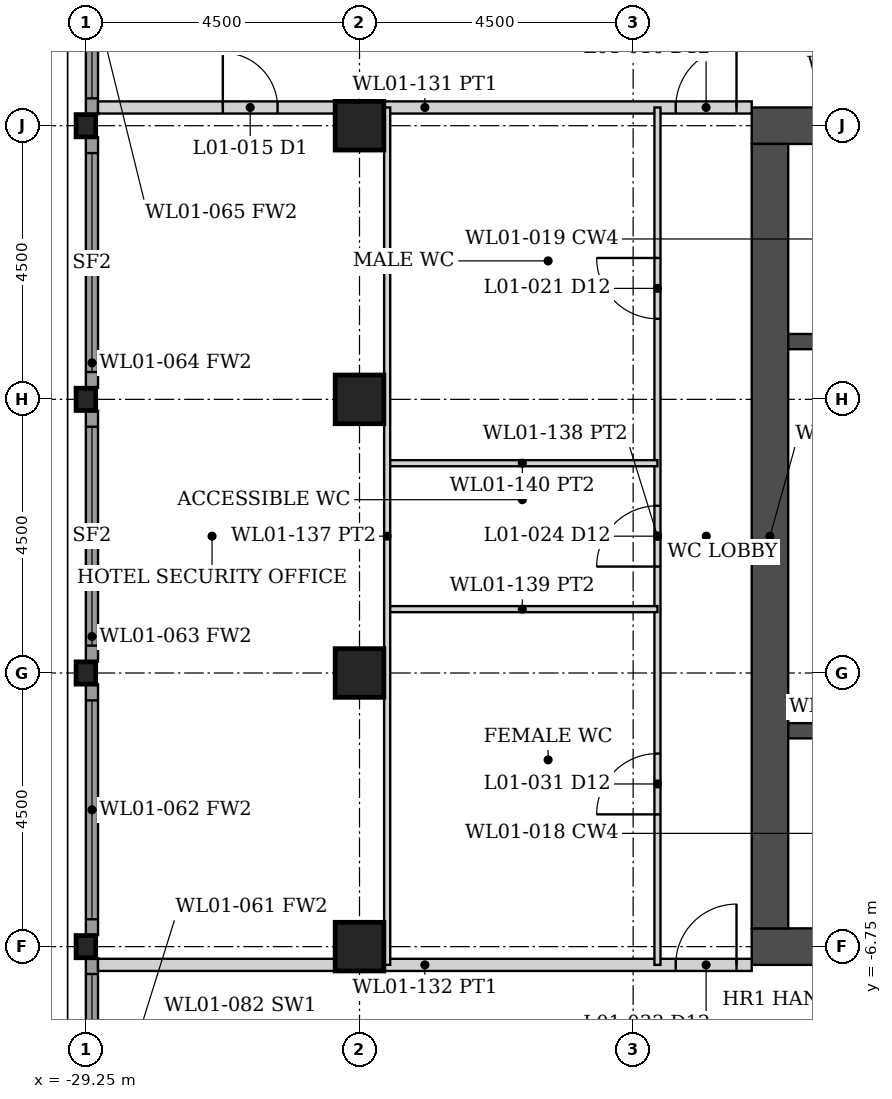
"""IFC4 building model, lengths in metres.
Left out: names, types, materials, properties, quantities, classifications, styles, units other than length and angle.
Written with IfcOpenShell. Run it as: python <this file> out.ifc"""

import sys

from ifc_helpers import new_model, si_unit, direction, frame, frame_2d, origin, origin_2d, place, context, subcontext, project, spatial, rectangle, hollow_rectangle, i_section, extrude, element, fill, save


model = new_model("IFC4")
c1 = context("Model", 3, precision=1e-05, world=origin(), true_north=direction((0.0, 1.0)))
c2 = subcontext(c1, "Body", "Model", "MODEL_VIEW")
j1 = project(units=[si_unit("LENGTHUNIT", "METRE"), si_unit("PLANEANGLEUNIT", "RADIAN")], contexts=[c1])
p1 = place(None, origin())
s1 = spatial("IfcSite", under=j1, at=p1, CompositionType="ELEMENT")
p2 = place(p1, origin())
s2 = spatial("IfcBuilding", under=s1, at=p2, CompositionType="ELEMENT")
p3 = place(p2, frame((0.0, 0.0, 6.0)))
s3 = spatial("IfcBuildingStorey", under=s2, at=p3, CompositionType="ELEMENT", Elevation=6.0)
for number, where, z_axis, x_axis in (
    (1, (-24.75, -6.75, 0.0), (0.0, 0.0, 1.0), (1.0, 0.0, 0.0)),
    (2, (-24.75, -2.25, 0.0), (0.0, 0.0, 1.0), (1.0, 0.0, 0.0)),
    (3, (-24.75, 2.25, 0.0), (0.0, 0.0, 1.0), (1.0, 0.0, 0.0)),
    (4, (-24.75, 6.75, 0.0), (0.0, 0.0, 1.0), (1.0, 0.0, 0.0)),
):
    element("IfcColumn", number, at=place(p3, frame(where, z_axis=z_axis, x_axis=x_axis)), inside=s3, PredefinedType="COLUMN", context=c2, shape_type="SweptSolid", body=[
        extrude(hollow_rectangle(XDim=0.8, YDim=0.8, WallThickness=0.08, at=origin_2d()), origin(), (0.0, 0.0, 1.0), 5.0),
    ])
for number, where, z_axis, x_axis in (
    (5, (-29.25, -6.75, 0.0), (0.0, 0.0, 1.0), (1.0, 0.0, 0.0)),
    (6, (-29.25, -2.25, 0.0), (0.0, 0.0, 1.0), (1.0, 0.0, 0.0)),
    (7, (-29.25, 2.25, 0.0), (0.0, 0.0, 1.0), (1.0, 0.0, 0.0)),
    (8, (-29.25, 6.75, 0.0), (0.0, 0.0, 1.0), (1.0, 0.0, 0.0)),
):
    element("IfcColumn", number, at=place(p3, frame(where, z_axis=z_axis, x_axis=x_axis)), inside=s3, PredefinedType="COLUMN", context=c2, shape_type="SweptSolid", body=[
        extrude(i_section(OverallWidth=0.322, OverallDepth=0.365, WebThickness=0.027, FlangeThickness=0.044, FilletRadius=0.015, at=origin_2d()), origin(), (0.0, 0.0, 1.0), 5.0),
    ])
for number, where, z_axis, x_axis in (
    (9, (-8.7, -6.75, 0.0), (0.0, 0.0, 1.0), (-1.0, 0.0, 0.0)),
    (10, (-8.7, 6.75, 0.0), (0.0, 0.0, 1.0), (-1.0, 0.0, 0.0)),
):
    element("IfcWall", number, at=place(p3, frame(where, z_axis=z_axis, x_axis=x_axis)), inside=s3, PredefinedType="SHEAR", context=c2, shape_type="SweptSolid", body=[
        extrude(rectangle(XDim=9.6, YDim=0.6, at=frame_2d((4.8, 0.0))), origin(), (0.0, 0.0, 1.0), 5.0),
    ])
p4 = place(p3, frame((-18.0, -6.45, 0.0), z_axis=(0.0, 0.0, 1.0), x_axis=(0.0, 1.0, 0.0)))
e11 = element("IfcWall", 11, at=p4, inside=s3, PredefinedType="SHEAR", context=c2, shape_type="SweptSolid", body=[
    extrude(rectangle(XDim=12.9, YDim=0.6, at=frame_2d((6.45, 0.0))), origin(), (0.0, 0.0, 1.0), 5.0),
])
p5 = place(p3, frame((-9.3, -3.2, 0.0), z_axis=(0.0, 0.0, 1.0), x_axis=(-1.0, 0.0, 0.0)))
e12 = element("IfcWall", 12, at=p5, inside=s3, PredefinedType="SHEAR", context=c2, shape_type="SweptSolid", body=[
    extrude(rectangle(XDim=8.4, YDim=0.25, at=frame_2d((4.2, 0.0))), origin(), (0.0, 0.0, 1.0), 5.0),
])
p6 = place(p5, frame((0.15, 0.0, 0.0)))
e13 = element("IfcOpeningElement", 13, at=p6, cuts=e12, PredefinedType="OPENING", context=c2, shape_type="SweptSolid", body=[
    extrude(rectangle(XDim=1.0, YDim=2.1, at=frame_2d((0.5, 1.05))), frame((0.0, 0.135, 0.0), z_axis=(0.0, -1.0, 0.0), x_axis=(1.0, 0.0, 0.0)), (0.0, 0.0, 1.0), 0.27),
])
p7 = place(p3, frame((-9.3, 3.2, 0.0), z_axis=(0.0, 0.0, 1.0), x_axis=(-1.0, 0.0, 0.0)))
e14 = element("IfcWall", 14, at=p7, inside=s3, PredefinedType="SHEAR", context=c2, shape_type="SweptSolid", body=[
    extrude(rectangle(XDim=8.4, YDim=0.25, at=frame_2d((4.2, 0.0))), origin(), (0.0, 0.0, 1.0), 5.0),
])
p8 = place(p3, frame((-29.15, -11.062, 0.0), z_axis=(0.0, 0.0, 1.0), x_axis=(0.0, 1.0, 0.0)))
e15 = element("IfcWall", 15, at=p8, inside=s3, PredefinedType="SOLIDWALL", context=c2, shape_type="SweptSolid", body=[
    extrude(rectangle(XDim=4.125, YDim=0.2, at=frame_2d((2.062, 0.0))), origin(), (0.0, 0.0, 1.0), 4.133),
])
p9 = place(p8, frame((0.262, 0.0, 0.15)))
e16 = element("IfcOpeningElement", 16, at=p9, cuts=e15, PredefinedType="OPENING", context=c2, shape_type="SweptSolid", body=[
    extrude(rectangle(XDim=3.6, YDim=3.833, at=frame_2d((1.8, 1.917))), frame((0.0, 0.11, 0.0), z_axis=(0.0, -1.0, 0.0), x_axis=(1.0, 0.0, 0.0)), (0.0, 0.0, 1.0), 0.22),
])
p10 = place(p3, frame((-29.15, -6.562, 0.0), z_axis=(0.0, 0.0, 1.0), x_axis=(0.0, 1.0, 0.0)))
e17 = element("IfcWall", 17, at=p10, inside=s3, PredefinedType="SOLIDWALL", context=c2, shape_type="SweptSolid", body=[
    extrude(rectangle(XDim=4.125, YDim=0.2, at=frame_2d((2.062, 0.0))), origin(), (0.0, 0.0, 1.0), 4.133),
])
p11 = place(p10, frame((0.262, 0.0, 0.15)))
e18 = element("IfcOpeningElement", 18, at=p11, cuts=e17, PredefinedType="OPENING", context=c2, shape_type="SweptSolid", body=[
    extrude(rectangle(XDim=3.6, YDim=3.833, at=frame_2d((1.8, 1.917))), frame((0.0, 0.11, 0.0), z_axis=(0.0, -1.0, 0.0), x_axis=(1.0, 0.0, 0.0)), (0.0, 0.0, 1.0), 0.22),
])
p12 = place(p3, frame((-29.15, -2.062, 0.0), z_axis=(0.0, 0.0, 1.0), x_axis=(0.0, 1.0, 0.0)))
e19 = element("IfcWall", 19, at=p12, inside=s3, PredefinedType="SOLIDWALL", context=c2, shape_type="SweptSolid", body=[
    extrude(rectangle(XDim=4.125, YDim=0.2, at=frame_2d((2.062, 0.0))), origin(), (0.0, 0.0, 1.0), 4.133),
])
p13 = place(p12, frame((0.262, 0.0, 0.15)))
e20 = element("IfcOpeningElement", 20, at=p13, cuts=e19, PredefinedType="OPENING", context=c2, shape_type="SweptSolid", body=[
    extrude(rectangle(XDim=3.6, YDim=3.833, at=frame_2d((1.8, 1.917))), frame((0.0, 0.11, 0.0), z_axis=(0.0, -1.0, 0.0), x_axis=(1.0, 0.0, 0.0)), (0.0, 0.0, 1.0), 0.22),
])
p14 = place(p3, frame((-29.15, 2.438, 0.0), z_axis=(0.0, 0.0, 1.0), x_axis=(0.0, 1.0, 0.0)))
e21 = element("IfcWall", 21, at=p14, inside=s3, PredefinedType="SOLIDWALL", context=c2, shape_type="SweptSolid", body=[
    extrude(rectangle(XDim=4.125, YDim=0.2, at=frame_2d((2.062, 0.0))), origin(), (0.0, 0.0, 1.0), 4.133),
])
p15 = place(p14, frame((0.262, 0.0, 0.15)))
e22 = element("IfcOpeningElement", 22, at=p15, cuts=e21, PredefinedType="OPENING", context=c2, shape_type="SweptSolid", body=[
    extrude(rectangle(XDim=3.6, YDim=3.833, at=frame_2d((1.8, 1.917))), frame((0.0, 0.11, 0.0), z_axis=(0.0, -1.0, 0.0), x_axis=(1.0, 0.0, 0.0)), (0.0, 0.0, 1.0), 0.22),
])
p16 = place(p3, frame((-29.15, 6.938, 0.0), z_axis=(0.0, 0.0, 1.0), x_axis=(0.0, 1.0, 0.0)))
e23 = element("IfcWall", 23, at=p16, inside=s3, PredefinedType="SOLIDWALL", context=c2, shape_type="SweptSolid", body=[
    extrude(rectangle(XDim=4.125, YDim=0.2, at=frame_2d((2.062, 0.0))), origin(), (0.0, 0.0, 1.0), 4.133),
])
p17 = place(p16, frame((0.262, 0.0, 0.15)))
e24 = element("IfcOpeningElement", 24, at=p17, cuts=e23, PredefinedType="OPENING", context=c2, shape_type="SweptSolid", body=[
    extrude(rectangle(XDim=3.6, YDim=3.833, at=frame_2d((1.8, 1.917))), frame((0.0, 0.11, 0.0), z_axis=(0.0, -1.0, 0.0), x_axis=(1.0, 0.0, 0.0)), (0.0, 0.0, 1.0), 0.22),
])
p18 = place(p3, frame((-29.05, 7.05, 0.0), z_axis=(0.0, 0.0, 1.0), x_axis=(1.0, 0.0, 0.0)))
e25 = element("IfcWall", 25, at=p18, inside=s3, PredefinedType="PARTITIONING", context=c2, shape_type="SweptSolid", body=[
    extrude(rectangle(XDim=10.75, YDim=0.2, at=frame_2d((5.375, 0.0))), origin(), (0.0, 0.0, 1.0), 3.829),
])
p19 = place(p18, frame((2.052, 0.0, 0.0)))
e26 = element("IfcOpeningElement", 26, at=p19, cuts=e25, PredefinedType="OPENING", context=c2, shape_type="SweptSolid", body=[
    extrude(rectangle(XDim=0.9, YDim=2.1, at=frame_2d((0.45, 1.05))), frame((0.0, 0.11, 0.0), z_axis=(0.0, -1.0, 0.0), x_axis=(1.0, 0.0, 0.0)), (0.0, 0.0, 1.0), 0.22),
])
p20 = place(p18, frame((9.5, 0.0, 0.0)))
e27 = element("IfcOpeningElement", 27, at=p20, cuts=e25, PredefinedType="OPENING", context=c2, shape_type="SweptSolid", body=[
    extrude(rectangle(XDim=1.0, YDim=2.1, at=frame_2d((0.5, 1.05))), frame((0.0, 0.11, 0.0), z_axis=(0.0, -1.0, 0.0), x_axis=(1.0, 0.0, 0.0)), (0.0, 0.0, 1.0), 0.22),
])
p21 = place(p3, frame((-29.05, -7.05, 0.0), z_axis=(0.0, 0.0, 1.0), x_axis=(1.0, 0.0, 0.0)))
e28 = element("IfcWall", 28, at=p21, inside=s3, PredefinedType="PARTITIONING", context=c2, shape_type="SweptSolid", body=[
    extrude(rectangle(XDim=10.75, YDim=0.2, at=frame_2d((5.375, 0.0))), origin(), (0.0, 0.0, 1.0), 3.829),
])
p22 = place(p21, frame((9.5, 0.0, 0.0)))
e29 = element("IfcOpeningElement", 29, at=p22, cuts=e28, PredefinedType="OPENING", context=c2, shape_type="SweptSolid", body=[
    extrude(rectangle(XDim=1.0, YDim=2.1, at=frame_2d((0.5, 1.05))), frame((0.0, 0.11, 0.0), z_axis=(0.0, -1.0, 0.0), x_axis=(1.0, 0.0, 0.0)), (0.0, 0.0, 1.0), 0.22),
])
p23 = place(p3, frame((-19.85, -7.05, 0.0), z_axis=(0.0, 0.0, 1.0), x_axis=(0.0, 1.0, 0.0)))
e30 = element("IfcWall", 30, at=p23, inside=s3, PredefinedType="PARTITIONING", context=c2, shape_type="SweptSolid", body=[
    extrude(rectangle(XDim=14.1, YDim=0.1, at=frame_2d((7.05, 0.0))), origin(), (0.0, 0.0, 1.0), 3.829),
])
p24 = place(p23, frame((2.475, 0.0, 0.0)))
e31 = element("IfcOpeningElement", 31, at=p24, cuts=e30, PredefinedType="OPENING", context=c2, shape_type="SweptSolid", body=[
    extrude(rectangle(XDim=1.0, YDim=2.1, at=frame_2d((0.5, 1.05))), frame((0.0, 0.06, 0.0), z_axis=(0.0, -1.0, 0.0), x_axis=(1.0, 0.0, 0.0)), (0.0, 0.0, 1.0), 0.12),
])
p25 = place(p23, frame((6.55, 0.0, 0.0)))
e32 = element("IfcOpeningElement", 32, at=p25, cuts=e30, PredefinedType="OPENING", context=c2, shape_type="SweptSolid", body=[
    extrude(rectangle(XDim=1.0, YDim=2.1, at=frame_2d((0.5, 1.05))), frame((0.0, 0.06, 0.0), z_axis=(0.0, -1.0, 0.0), x_axis=(1.0, 0.0, 0.0)), (0.0, 0.0, 1.0), 0.12),
])
p26 = place(p23, frame((10.625, 0.0, 0.0)))
e33 = element("IfcOpeningElement", 33, at=p26, cuts=e30, PredefinedType="OPENING", context=c2, shape_type="SweptSolid", body=[
    extrude(rectangle(XDim=1.0, YDim=2.1, at=frame_2d((0.5, 1.05))), frame((0.0, 0.06, 0.0), z_axis=(0.0, -1.0, 0.0), x_axis=(1.0, 0.0, 0.0)), (0.0, 0.0, 1.0), 0.12),
])
for number, where, z_axis, x_axis in (
    (34, (-24.295, -1.2, 0.0), (0.0, 0.0, 1.0), (1.0, 0.0, 0.0)),
    (35, (-24.295, 1.2, 0.0), (0.0, 0.0, 1.0), (1.0, 0.0, 0.0)),
):
    element("IfcWall", number, at=place(p3, frame(where, z_axis=z_axis, x_axis=x_axis)), inside=s3, PredefinedType="PARTITIONING", context=c2, shape_type="SweptSolid", body=[
        extrude(rectangle(XDim=4.445, YDim=0.1, at=frame_2d((2.222, 0.0))), origin(), (0.0, 0.0, 1.0), 3.829),
    ])
p27 = place(p3, frame((-24.295, -7.05, 0.0), z_axis=(0.0, 0.0, 1.0), x_axis=(0.0, 1.0, 0.0)))
e36 = element("IfcWall", 36, at=p27, inside=s3, PredefinedType="PARTITIONING", context=c2, shape_type="SweptSolid", body=[
    extrude(rectangle(XDim=14.1, YDim=0.1, at=frame_2d((7.05, 0.0))), origin(), (0.0, 0.0, 1.0), 3.829),
])
p28 = place(p9, origin())
e37 = element("IfcWindow", 37, at=p28, inside=s3, PartitioningType="SINGLE_PANEL", PredefinedType="WINDOW", context=c2, shape_type="SweptSolid", body=[
    extrude(rectangle(XDim=3.6, YDim=3.833, at=frame_2d((1.8, 1.917))), frame((0.0, 0.03, 0.0), z_axis=(0.0, -1.0, 0.0), x_axis=(1.0, 0.0, 0.0)), (0.0, 0.0, 1.0), 0.06),
])
fill(e16, e37)
p29 = place(p11, origin())
e38 = element("IfcWindow", 38, at=p29, inside=s3, PartitioningType="SINGLE_PANEL", PredefinedType="WINDOW", context=c2, shape_type="SweptSolid", body=[
    extrude(rectangle(XDim=3.6, YDim=3.833, at=frame_2d((1.8, 1.917))), frame((0.0, 0.03, 0.0), z_axis=(0.0, -1.0, 0.0), x_axis=(1.0, 0.0, 0.0)), (0.0, 0.0, 1.0), 0.06),
])
fill(e18, e38)
p30 = place(p13, origin())
e39 = element("IfcWindow", 39, at=p30, inside=s3, PartitioningType="SINGLE_PANEL", PredefinedType="WINDOW", context=c2, shape_type="SweptSolid", body=[
    extrude(rectangle(XDim=3.6, YDim=3.833, at=frame_2d((1.8, 1.917))), frame((0.0, 0.03, 0.0), z_axis=(0.0, -1.0, 0.0), x_axis=(1.0, 0.0, 0.0)), (0.0, 0.0, 1.0), 0.06),
])
fill(e20, e39)
p31 = place(p15, origin())
e40 = element("IfcWindow", 40, at=p31, inside=s3, PartitioningType="SINGLE_PANEL", PredefinedType="WINDOW", context=c2, shape_type="SweptSolid", body=[
    extrude(rectangle(XDim=3.6, YDim=3.833, at=frame_2d((1.8, 1.917))), frame((0.0, 0.03, 0.0), z_axis=(0.0, -1.0, 0.0), x_axis=(1.0, 0.0, 0.0)), (0.0, 0.0, 1.0), 0.06),
])
fill(e22, e40)
p32 = place(p17, origin())
e41 = element("IfcWindow", 41, at=p32, inside=s3, PartitioningType="SINGLE_PANEL", PredefinedType="WINDOW", context=c2, shape_type="SweptSolid", body=[
    extrude(rectangle(XDim=3.6, YDim=3.833, at=frame_2d((1.8, 1.917))), frame((0.0, 0.03, 0.0), z_axis=(0.0, -1.0, 0.0), x_axis=(1.0, 0.0, 0.0)), (0.0, 0.0, 1.0), 0.06),
])
fill(e24, e41)
p33 = place(p24, origin())
e42 = element("IfcDoor", 42, at=p33, inside=s3, OperationType="SINGLE_SWING_LEFT", PredefinedType="DOOR", context=c2, shape_type="SweptSolid", body=[
    extrude(rectangle(XDim=1.0, YDim=2.1, at=frame_2d((0.5, 1.05))), frame((0.0, 0.025, 0.0), z_axis=(0.0, -1.0, 0.0), x_axis=(1.0, 0.0, 0.0)), (0.0, 0.0, 1.0), 0.05),
])
fill(e31, e42)
p34 = place(p25, origin())
e43 = element("IfcDoor", 43, at=p34, inside=s3, OperationType="SINGLE_SWING_LEFT", PredefinedType="DOOR", context=c2, shape_type="SweptSolid", body=[
    extrude(rectangle(XDim=1.0, YDim=2.1, at=frame_2d((0.5, 1.05))), frame((0.0, 0.025, 0.0), z_axis=(0.0, -1.0, 0.0), x_axis=(1.0, 0.0, 0.0)), (0.0, 0.0, 1.0), 0.05),
])
fill(e32, e43)
p35 = place(p26, origin())
e44 = element("IfcDoor", 44, at=p35, inside=s3, OperationType="SINGLE_SWING_RIGHT", PredefinedType="DOOR", context=c2, shape_type="SweptSolid", body=[
    extrude(rectangle(XDim=1.0, YDim=2.1, at=frame_2d((0.5, 1.05))), frame((0.0, 0.025, 0.0), z_axis=(0.0, -1.0, 0.0), x_axis=(1.0, 0.0, 0.0)), (0.0, 0.0, 1.0), 0.05),
])
fill(e33, e44)
p36 = place(p19, origin())
e45 = element("IfcDoor", 45, at=p36, inside=s3, OperationType="SINGLE_SWING_LEFT", PredefinedType="DOOR", context=c2, shape_type="SweptSolid", body=[
    extrude(rectangle(XDim=0.9, YDim=2.1, at=frame_2d((0.45, 1.05))), frame((0.0, 0.025, 0.0), z_axis=(0.0, -1.0, 0.0), x_axis=(1.0, 0.0, 0.0)), (0.0, 0.0, 1.0), 0.05),
])
fill(e26, e45)
p37 = place(p20, origin())
e46 = element("IfcDoor", 46, at=p37, inside=s3, OperationType="SINGLE_SWING_RIGHT", PredefinedType="DOOR", context=c2, shape_type="SweptSolid", body=[
    extrude(rectangle(XDim=1.0, YDim=2.1, at=frame_2d((0.5, 1.05))), frame((0.0, 0.025, 0.0), z_axis=(0.0, -1.0, 0.0), x_axis=(1.0, 0.0, 0.0)), (0.0, 0.0, 1.0), 0.05),
])
fill(e27, e46)
p38 = place(p22, origin())
e47 = element("IfcDoor", 47, at=p38, inside=s3, OperationType="SINGLE_SWING_RIGHT", PredefinedType="DOOR", context=c2, shape_type="SweptSolid", body=[
    extrude(rectangle(XDim=1.0, YDim=2.1, at=frame_2d((0.5, 1.05))), frame((0.0, 0.025, 0.0), z_axis=(0.0, -1.0, 0.0), x_axis=(1.0, 0.0, 0.0)), (0.0, 0.0, 1.0), 0.05),
])
fill(e29, e47)
save(model, sys.argv[1])
